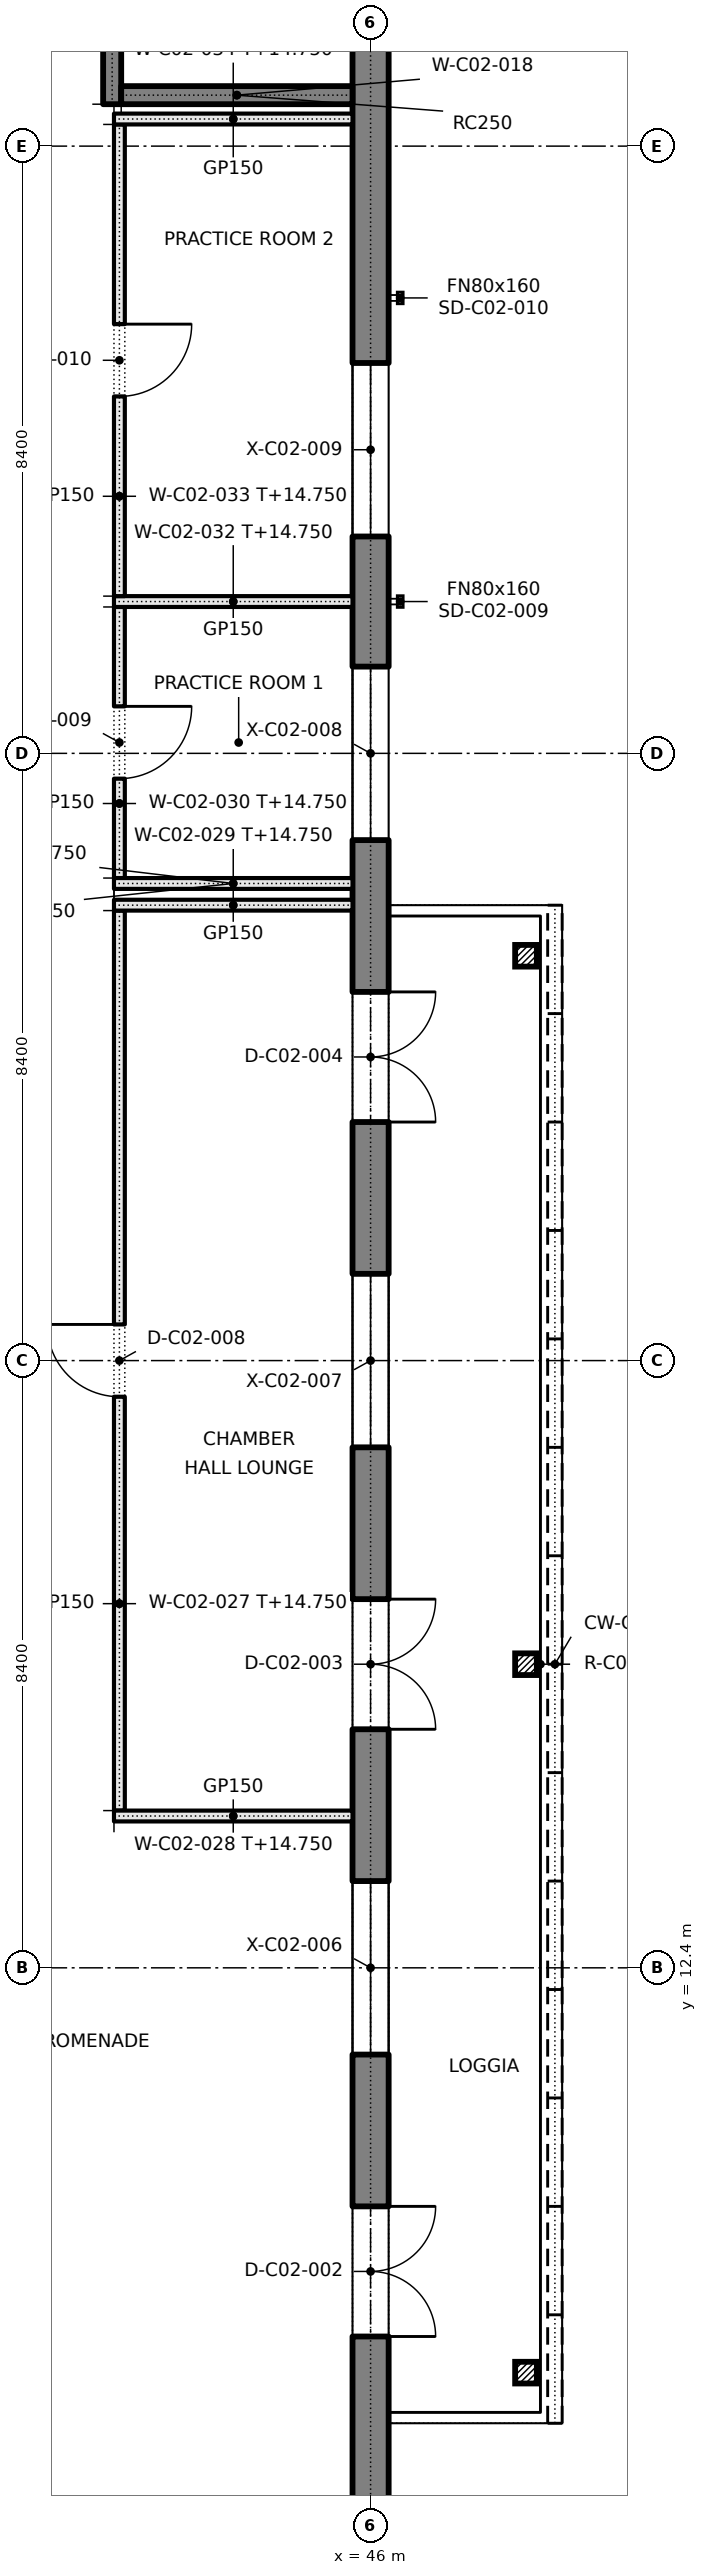
"""IFC4 building model, lengths in metres.
Left out: names, types, materials, properties, quantities, classifications, styles, units other than length and angle.
Written with IfcOpenShell. Run it as: python <this file> out.ifc"""

import sys

from ifc_helpers import new_model, si_unit, direction, frame, frame_2d, origin, origin_2d, place, context, subcontext, project, spatial, rectangle, extrude, element, fill, save


model = new_model("IFC4")
c1 = context("Model", 3, precision=1e-05, world=origin(), true_north=direction((0.0, 1.0)))
c2 = subcontext(c1, "Body", "Model", "MODEL_VIEW")
j1 = project(units=[si_unit("LENGTHUNIT", "METRE"), si_unit("PLANEANGLEUNIT", "RADIAN")], contexts=[c1])
p1 = place(None, origin())
s1 = spatial("IfcSite", under=j1, at=p1, CompositionType="ELEMENT")
p2 = place(p1, origin())
s2 = spatial("IfcBuilding", under=s1, at=p2, CompositionType="ELEMENT")
p3 = place(p2, frame((0.0, 0.0, 10.2)))
s3 = spatial("IfcBuildingStorey", under=s2, at=p3, CompositionType="ELEMENT", Elevation=10.2)
p4 = place(p3, frame((46.0, 3.75, 0.0), z_axis=(0.0, 0.0, 1.0), x_axis=(0.0, 1.0, 0.0)))
e1 = element("IfcWall", 1, at=p4, inside=s3, PredefinedType="SOLIDWALL", context=c2, shape_type="SweptSolid", body=[
    extrude(rectangle(XDim=42.5, YDim=0.5, at=frame_2d((21.25, 0.0))), origin(), (0.0, 0.0, 1.0), 4.8),
])
p5 = place(p4, frame((7.45, 0.0, 0.9)))
e2 = element("IfcOpeningElement", 2, at=p5, cuts=e1, PredefinedType="OPENING", context=c2, shape_type="SweptSolid", body=[
    extrude(rectangle(XDim=2.4, YDim=2.4, at=frame_2d((1.2, 1.2))), frame((0.0, 0.26, 0.0), z_axis=(0.0, -1.0, 0.0), x_axis=(1.0, 0.0, 0.0)), (0.0, 0.0, 1.0), 0.52),
])
p6 = place(p4, frame((15.85, 0.0, 0.9)))
e3 = element("IfcOpeningElement", 3, at=p6, cuts=e1, PredefinedType="OPENING", context=c2, shape_type="SweptSolid", body=[
    extrude(rectangle(XDim=2.4, YDim=2.4, at=frame_2d((1.2, 1.2))), frame((0.0, 0.26, 0.0), z_axis=(0.0, -1.0, 0.0), x_axis=(1.0, 0.0, 0.0)), (0.0, 0.0, 1.0), 0.52),
])
p7 = place(p4, frame((24.25, 0.0, 0.9)))
e4 = element("IfcOpeningElement", 4, at=p7, cuts=e1, PredefinedType="OPENING", context=c2, shape_type="SweptSolid", body=[
    extrude(rectangle(XDim=2.4, YDim=2.4, at=frame_2d((1.2, 1.2))), frame((0.0, 0.26, 0.0), z_axis=(0.0, -1.0, 0.0), x_axis=(1.0, 0.0, 0.0)), (0.0, 0.0, 1.0), 0.52),
])
p8 = place(p4, frame((28.45, 0.0, 0.9)))
e5 = element("IfcOpeningElement", 5, at=p8, cuts=e1, PredefinedType="OPENING", context=c2, shape_type="SweptSolid", body=[
    extrude(rectangle(XDim=2.4, YDim=2.4, at=frame_2d((1.2, 1.2))), frame((0.0, 0.26, 0.0), z_axis=(0.0, -1.0, 0.0), x_axis=(1.0, 0.0, 0.0)), (0.0, 0.0, 1.0), 0.52),
])
p9 = place(p4, frame((3.55, 0.0, 0.0)))
e6 = element("IfcOpeningElement", 6, at=p9, cuts=e1, PredefinedType="OPENING", context=c2, shape_type="SweptSolid", body=[
    extrude(rectangle(XDim=1.8, YDim=2.5, at=frame_2d((0.9, 1.25))), frame((0.0, 0.26, 0.0), z_axis=(0.0, -1.0, 0.0), x_axis=(1.0, 0.0, 0.0)), (0.0, 0.0, 1.0), 0.52),
])
p10 = place(p4, frame((11.95, 0.0, 0.0)))
e7 = element("IfcOpeningElement", 7, at=p10, cuts=e1, PredefinedType="OPENING", context=c2, shape_type="SweptSolid", body=[
    extrude(rectangle(XDim=1.8, YDim=2.5, at=frame_2d((0.9, 1.25))), frame((0.0, 0.26, 0.0), z_axis=(0.0, -1.0, 0.0), x_axis=(1.0, 0.0, 0.0)), (0.0, 0.0, 1.0), 0.52),
])
p11 = place(p4, frame((20.35, 0.0, 0.0)))
e8 = element("IfcOpeningElement", 8, at=p11, cuts=e1, PredefinedType="OPENING", context=c2, shape_type="SweptSolid", body=[
    extrude(rectangle(XDim=1.8, YDim=2.5, at=frame_2d((0.9, 1.25))), frame((0.0, 0.26, 0.0), z_axis=(0.0, -1.0, 0.0), x_axis=(1.0, 0.0, 0.0)), (0.0, 0.0, 1.0), 0.52),
])
p12 = place(p3, frame((42.425, 38.18, 0.0), z_axis=(0.0, 0.0, 1.0), x_axis=(0.0, 1.0, 0.0)))
e9 = element("IfcWall", 9, at=p12, inside=s3, PredefinedType="SOLIDWALL", context=c2, shape_type="SweptSolid", body=[
    extrude(rectangle(XDim=7.57, YDim=0.25, at=frame_2d((3.785, 0.0))), origin(), (0.0, 0.0, 1.0), 4.8),
])
p13 = place(p12, frame((6.17, 0.0, 0.0)))
e10 = element("IfcOpeningElement", 10, at=p13, cuts=e9, PredefinedType="OPENING", context=c2, shape_type="SweptSolid", body=[
    extrude(rectangle(XDim=1.2, YDim=2.1, at=frame_2d((0.6, 1.05))), frame((0.0, 0.135, 0.0), z_axis=(0.0, -1.0, 0.0), x_axis=(1.0, 0.0, 0.0)), (0.0, 0.0, 1.0), 0.27),
])
p14 = place(p3, frame((42.55, 38.305, 0.0), z_axis=(0.0, 0.0, 1.0), x_axis=(1.0, 0.0, 0.0)))
e11 = element("IfcWall", 11, at=p14, inside=s3, PredefinedType="SOLIDWALL", context=c2, shape_type="SweptSolid", body=[
    extrude(rectangle(XDim=3.2, YDim=0.25, at=frame_2d((1.6, 0.0))), origin(), (0.0, 0.0, 1.0), 4.8),
])
for number, where, z_axis, x_axis in (
    (12, (48.15, 6.8, 0.0), (0.0, 0.0, 1.0), (1.0, 0.0, 0.0)),
    (13, (48.15, 16.6, 0.0), (0.0, 0.0, 1.0), (1.0, 0.0, 0.0)),
    (14, (48.15, 26.4, 0.0), (0.0, 0.0, 1.0), (1.0, 0.0, 0.0)),
):
    element("IfcColumn", number, at=place(p3, frame(where, z_axis=z_axis, x_axis=x_axis)), inside=s3, PredefinedType="COLUMN", context=c2, shape_type="SweptSolid", body=[
        extrude(rectangle(XDim=0.3, YDim=0.3, at=origin_2d()), origin(), (0.0, 0.0, 1.0), 4.8),
    ])
p15 = place(p3, frame((42.525, 14.575, 0.0), z_axis=(0.0, 0.0, 1.0), x_axis=(0.0, 1.0, 0.0)))
e15 = element("IfcWall", 15, at=p15, inside=s3, PredefinedType="PARTITIONING", context=c2, shape_type="SweptSolid", body=[
    extrude(rectangle(XDim=12.45, YDim=0.15, at=frame_2d((6.225, 0.0))), origin(), (0.0, 0.0, 1.0), 4.55),
])
p16 = place(p15, frame((5.725, 0.0, 0.0)))
e16 = element("IfcOpeningElement", 16, at=p16, cuts=e15, PredefinedType="OPENING", context=c2, shape_type="SweptSolid", body=[
    extrude(rectangle(XDim=1.0, YDim=2.1, at=frame_2d((0.5, 1.05))), frame((0.0, 0.085, 0.0), z_axis=(0.0, -1.0, 0.0), x_axis=(1.0, 0.0, 0.0)), (0.0, 0.0, 1.0), 0.17),
])
for number, where, z_axis, x_axis in (
    (17, (42.45, 14.5, 0.0), (0.0, 0.0, 1.0), (1.0, 0.0, 0.0)),
    (18, (42.45, 27.1, 0.0), (0.0, 0.0, 1.0), (1.0, 0.0, 0.0)),
):
    element("IfcWall", number, at=place(p3, frame(where, z_axis=z_axis, x_axis=x_axis)), inside=s3, PredefinedType="PARTITIONING", context=c2, shape_type="SweptSolid", body=[
        extrude(rectangle(XDim=3.3, YDim=0.15, at=frame_2d((1.65, 0.0))), origin(), (0.0, 0.0, 1.0), 4.55),
    ])
p17 = place(p3, frame((42.525, 27.475, 0.0), z_axis=(0.0, 0.0, 1.0), x_axis=(0.0, 1.0, 0.0)))
e19 = element("IfcWall", 19, at=p17, inside=s3, PredefinedType="PARTITIONING", context=c2, shape_type="SweptSolid", body=[
    extrude(rectangle(XDim=3.75, YDim=0.15, at=frame_2d((1.875, 0.0))), origin(), (0.0, 0.0, 1.0), 4.55),
])
p18 = place(p17, frame((1.375, 0.0, 0.0)))
e20 = element("IfcOpeningElement", 20, at=p18, cuts=e19, PredefinedType="OPENING", context=c2, shape_type="SweptSolid", body=[
    extrude(rectangle(XDim=1.0, YDim=2.1, at=frame_2d((0.5, 1.05))), frame((0.0, 0.085, 0.0), z_axis=(0.0, -1.0, 0.0), x_axis=(1.0, 0.0, 0.0)), (0.0, 0.0, 1.0), 0.17),
])
for number, where, z_axis, x_axis in (
    (21, (42.45, 27.4, 0.0), (0.0, 0.0, 1.0), (1.0, 0.0, 0.0)),
    (22, (42.45, 31.3, 0.0), (0.0, 0.0, 1.0), (1.0, 0.0, 0.0)),
):
    element("IfcWall", number, at=place(p3, frame(where, z_axis=z_axis, x_axis=x_axis)), inside=s3, PredefinedType="PARTITIONING", context=c2, shape_type="SweptSolid", body=[
        extrude(rectangle(XDim=3.3, YDim=0.15, at=frame_2d((1.65, 0.0))), origin(), (0.0, 0.0, 1.0), 4.55),
    ])
p19 = place(p3, frame((42.525, 31.375, 0.0), z_axis=(0.0, 0.0, 1.0), x_axis=(0.0, 1.0, 0.0)))
e23 = element("IfcWall", 23, at=p19, inside=s3, PredefinedType="PARTITIONING", context=c2, shape_type="SweptSolid", body=[
    extrude(rectangle(XDim=6.525, YDim=0.15, at=frame_2d((3.262, 0.0))), origin(), (0.0, 0.0, 1.0), 4.55),
])
p20 = place(p19, frame((2.762, 0.0, 0.0)))
e24 = element("IfcOpeningElement", 24, at=p20, cuts=e23, PredefinedType="OPENING", context=c2, shape_type="SweptSolid", body=[
    extrude(rectangle(XDim=1.0, YDim=2.1, at=frame_2d((0.5, 1.05))), frame((0.0, 0.085, 0.0), z_axis=(0.0, -1.0, 0.0), x_axis=(1.0, 0.0, 0.0)), (0.0, 0.0, 1.0), 0.17),
])
p21 = place(p3, frame((42.45, 37.975, 0.0), z_axis=(0.0, 0.0, 1.0), x_axis=(1.0, 0.0, 0.0)))
e25 = element("IfcWall", 25, at=p21, inside=s3, PredefinedType="PARTITIONING", context=c2, shape_type="SweptSolid", body=[
    extrude(rectangle(XDim=3.3, YDim=0.15, at=frame_2d((1.65, 0.0))), origin(), (0.0, 0.0, 1.0), 4.55),
])
p22 = place(p5, origin())
e26 = element("IfcWindow", 26, at=p22, inside=s3, PartitioningType="SINGLE_PANEL", PredefinedType="WINDOW", context=c2, shape_type="SweptSolid", body=[
    extrude(rectangle(XDim=2.4, YDim=2.4, at=frame_2d((1.2, 1.2))), frame((0.0, 0.03, 0.0), z_axis=(0.0, -1.0, 0.0), x_axis=(1.0, 0.0, 0.0)), (0.0, 0.0, 1.0), 0.06),
])
fill(e2, e26)
p23 = place(p6, origin())
e27 = element("IfcWindow", 27, at=p23, inside=s3, PartitioningType="SINGLE_PANEL", PredefinedType="WINDOW", context=c2, shape_type="SweptSolid", body=[
    extrude(rectangle(XDim=2.4, YDim=2.4, at=frame_2d((1.2, 1.2))), frame((0.0, 0.03, 0.0), z_axis=(0.0, -1.0, 0.0), x_axis=(1.0, 0.0, 0.0)), (0.0, 0.0, 1.0), 0.06),
])
fill(e3, e27)
p24 = place(p7, origin())
e28 = element("IfcWindow", 28, at=p24, inside=s3, PartitioningType="SINGLE_PANEL", PredefinedType="WINDOW", context=c2, shape_type="SweptSolid", body=[
    extrude(rectangle(XDim=2.4, YDim=2.4, at=frame_2d((1.2, 1.2))), frame((0.0, 0.03, 0.0), z_axis=(0.0, -1.0, 0.0), x_axis=(1.0, 0.0, 0.0)), (0.0, 0.0, 1.0), 0.06),
])
fill(e4, e28)
p25 = place(p8, origin())
e29 = element("IfcWindow", 29, at=p25, inside=s3, PartitioningType="SINGLE_PANEL", PredefinedType="WINDOW", context=c2, shape_type="SweptSolid", body=[
    extrude(rectangle(XDim=2.4, YDim=2.4, at=frame_2d((1.2, 1.2))), frame((0.0, 0.03, 0.0), z_axis=(0.0, -1.0, 0.0), x_axis=(1.0, 0.0, 0.0)), (0.0, 0.0, 1.0), 0.06),
])
fill(e5, e29)
p26 = place(p9, frame((1.8, 0.0, 0.0), z_axis=(0.0, 0.0, 1.0), x_axis=(-1.0, 0.0, 0.0)))
e30 = element("IfcDoor", 30, at=p26, inside=s3, OperationType="DOUBLE_DOOR_SINGLE_SWING", PredefinedType="DOOR", context=c2, shape_type="SweptSolid", body=[
    extrude(rectangle(XDim=1.8, YDim=2.5, at=frame_2d((0.9, 1.25))), frame((0.0, 0.025, 0.0), z_axis=(0.0, -1.0, 0.0), x_axis=(1.0, 0.0, 0.0)), (0.0, 0.0, 1.0), 0.05),
])
fill(e6, e30)
p27 = place(p10, frame((1.8, 0.0, 0.0), z_axis=(0.0, 0.0, 1.0), x_axis=(-1.0, 0.0, 0.0)))
e31 = element("IfcDoor", 31, at=p27, inside=s3, OperationType="DOUBLE_DOOR_SINGLE_SWING", PredefinedType="DOOR", context=c2, shape_type="SweptSolid", body=[
    extrude(rectangle(XDim=1.8, YDim=2.5, at=frame_2d((0.9, 1.25))), frame((0.0, 0.025, 0.0), z_axis=(0.0, -1.0, 0.0), x_axis=(1.0, 0.0, 0.0)), (0.0, 0.0, 1.0), 0.05),
])
fill(e7, e31)
p28 = place(p11, frame((1.8, 0.0, 0.0), z_axis=(0.0, 0.0, 1.0), x_axis=(-1.0, 0.0, 0.0)))
e32 = element("IfcDoor", 32, at=p28, inside=s3, OperationType="DOUBLE_DOOR_SINGLE_SWING", PredefinedType="DOOR", context=c2, shape_type="SweptSolid", body=[
    extrude(rectangle(XDim=1.8, YDim=2.5, at=frame_2d((0.9, 1.25))), frame((0.0, 0.025, 0.0), z_axis=(0.0, -1.0, 0.0), x_axis=(1.0, 0.0, 0.0)), (0.0, 0.0, 1.0), 0.05),
])
fill(e8, e32)
p29 = place(p16, origin())
e33 = element("IfcDoor", 33, at=p29, inside=s3, OperationType="SINGLE_SWING_RIGHT", PredefinedType="DOOR", context=c2, shape_type="SweptSolid", body=[
    extrude(rectangle(XDim=1.0, YDim=2.1, at=frame_2d((0.5, 1.05))), frame((0.0, 0.025, 0.0), z_axis=(0.0, -1.0, 0.0), x_axis=(1.0, 0.0, 0.0)), (0.0, 0.0, 1.0), 0.05),
])
fill(e16, e33)
p30 = place(p18, frame((1.0, 0.0, 0.0), z_axis=(0.0, 0.0, 1.0), x_axis=(-1.0, 0.0, 0.0)))
e34 = element("IfcDoor", 34, at=p30, inside=s3, OperationType="SINGLE_SWING_LEFT", PredefinedType="DOOR", context=c2, shape_type="SweptSolid", body=[
    extrude(rectangle(XDim=1.0, YDim=2.1, at=frame_2d((0.5, 1.05))), frame((0.0, 0.025, 0.0), z_axis=(0.0, -1.0, 0.0), x_axis=(1.0, 0.0, 0.0)), (0.0, 0.0, 1.0), 0.05),
])
fill(e20, e34)
p31 = place(p20, frame((1.0, 0.0, 0.0), z_axis=(0.0, 0.0, 1.0), x_axis=(-1.0, 0.0, 0.0)))
e35 = element("IfcDoor", 35, at=p31, inside=s3, OperationType="SINGLE_SWING_LEFT", PredefinedType="DOOR", context=c2, shape_type="SweptSolid", body=[
    extrude(rectangle(XDim=1.0, YDim=2.1, at=frame_2d((0.5, 1.05))), frame((0.0, 0.025, 0.0), z_axis=(0.0, -1.0, 0.0), x_axis=(1.0, 0.0, 0.0)), (0.0, 0.0, 1.0), 0.05),
])
fill(e24, e35)
save(model, sys.argv[1])
